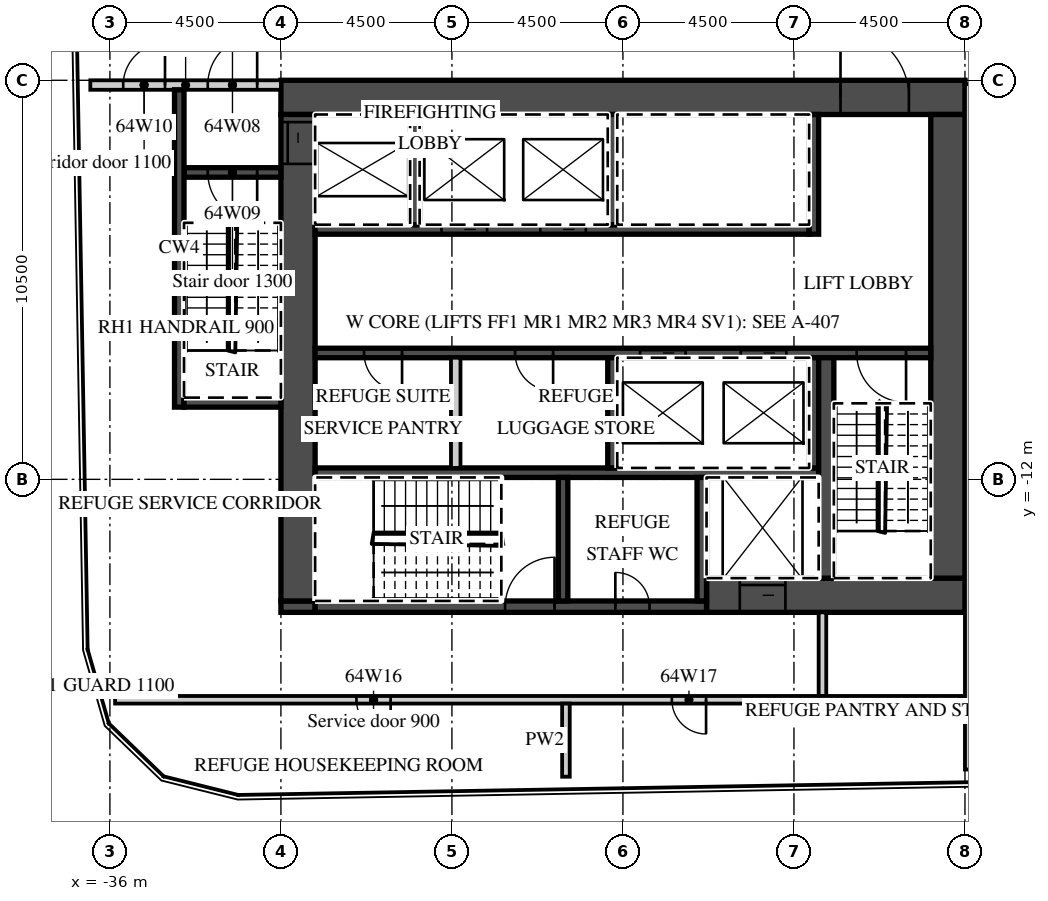
"""IFC4 building model, lengths in metres.
Left out: names, types, materials, properties, quantities, classifications, styles, units other than length and angle.
Written with IfcOpenShell. Run it as: python <this file> out.ifc"""

import sys

from ifc_helpers import new_model, si_unit, direction, frame, frame_2d, origin, place, context, subcontext, project, spatial, rectangle, extrude, element, fill, save


model = new_model("IFC4")
c1 = context("Model", 3, precision=1e-05, world=origin(), true_north=direction((0.0, 1.0)))
c2 = subcontext(c1, "Body", "Model", "MODEL_VIEW")
j1 = project(units=[si_unit("LENGTHUNIT", "METRE"), si_unit("PLANEANGLEUNIT", "RADIAN")], contexts=[c1])
p1 = place(None, origin())
s1 = spatial("IfcSite", under=j1, at=p1, CompositionType="ELEMENT")
p2 = place(p1, origin())
s2 = spatial("IfcBuilding", under=s1, at=p2, CompositionType="ELEMENT")
p3 = place(p2, frame((0.0, 0.0, 257.3)))
s3 = spatial("IfcBuildingStorey", under=s2, at=p3, CompositionType="ELEMENT", Elevation=257.3)
p4 = place(p3, frame((-31.5, -1.95, 0.0), z_axis=(0.0, 0.0, 1.0), x_axis=(1.0, 0.0, 0.0)))
e1 = element("IfcWall", 1, at=p4, inside=s3, PredefinedType="SHEAR", context=c2, shape_type="SweptSolid", body=[
    extrude(rectangle(XDim=18.0, YDim=0.9, at=frame_2d((9.0, 0.0))), origin(), (0.0, 0.0, 1.0), 4.2),
])
p5 = place(p4, frame((14.725, 0.0, 0.0)))
e2 = element("IfcOpeningElement", 2, at=p5, cuts=e1, PredefinedType="OPENING", context=c2, shape_type="SweptSolid", body=[
    extrude(rectangle(XDim=1.8, YDim=2.1, at=frame_2d((0.9, 1.05))), frame((0.0, 0.46, 0.0), z_axis=(0.0, -1.0, 0.0), x_axis=(1.0, 0.0, 0.0)), (0.0, 0.0, 1.0), 0.92),
])
p6 = place(p3, frame((-20.3, -15.05, 0.0), z_axis=(0.0, 0.0, 1.0), x_axis=(1.0, 0.0, 0.0)))
e3 = element("IfcWall", 3, at=p6, inside=s3, PredefinedType="SHEAR", context=c2, shape_type="SweptSolid", body=[
    extrude(rectangle(XDim=6.8, YDim=0.9, at=frame_2d((3.4, 0.0))), origin(), (0.0, 0.0, 1.0), 4.2),
])
p7 = place(p6, frame((0.875, 0.0, 0.0)))
e4 = element("IfcOpeningElement", 4, at=p7, cuts=e3, PredefinedType="OPENING", context=c2, shape_type="SweptSolid", body=[
    extrude(rectangle(XDim=1.2, YDim=2.1, at=frame_2d((0.6, 1.05))), frame((0.0, 0.46, 0.0), z_axis=(0.0, -1.0, 0.0), x_axis=(1.0, 0.0, 0.0)), (0.0, 0.0, 1.0), 0.92),
])
p8 = place(p3, frame((-31.5, -15.35, 0.0), z_axis=(0.0, 0.0, 1.0), x_axis=(1.0, 0.0, 0.0)))
e5 = element("IfcWall", 5, at=p8, inside=s3, PredefinedType="SHEAR", context=c2, shape_type="SweptSolid", body=[
    extrude(rectangle(XDim=0.9, YDim=0.3, at=frame_2d((0.45, 0.0))), origin(), (0.0, 0.0, 1.0), 4.2),
])
p9 = place(p3, frame((-30.6, -15.35, 0.0), z_axis=(0.0, 0.0, 1.0), x_axis=(1.0, 0.0, 0.0)))
e6 = element("IfcWall", 6, at=p9, inside=s3, PredefinedType="SHEAR", context=c2, shape_type="SweptSolid", body=[
    extrude(rectangle(XDim=10.3, YDim=0.3, at=frame_2d((5.15, 0.0))), origin(), (0.0, 0.0, 1.0), 4.2),
])
p10 = place(p9, frame((5.0, 0.0, 0.0)))
e7 = element("IfcOpeningElement", 7, at=p10, cuts=e6, PredefinedType="OPENING", context=c2, shape_type="SweptSolid", body=[
    extrude(rectangle(XDim=1.3, YDim=2.1, at=frame_2d((0.65, 1.05))), frame((0.0, 0.16, 0.0), z_axis=(0.0, -1.0, 0.0), x_axis=(1.0, 0.0, 0.0)), (0.0, 0.0, 1.0), 0.32),
])
p11 = place(p9, frame((7.9, 0.0, 0.0)))
e8 = element("IfcOpeningElement", 8, at=p11, cuts=e6, PredefinedType="OPENING", context=c2, shape_type="SweptSolid", body=[
    extrude(rectangle(XDim=0.9, YDim=2.1, at=frame_2d((0.45, 1.05))), frame((0.0, 0.16, 0.0), z_axis=(0.0, -1.0, 0.0), x_axis=(1.0, 0.0, 0.0)), (0.0, 0.0, 1.0), 0.32),
])
p12 = place(p3, frame((-31.05, -15.2, 0.0), z_axis=(0.0, 0.0, 1.0), x_axis=(0.0, 1.0, 0.0)))
e9 = element("IfcWall", 9, at=p12, inside=s3, PredefinedType="SHEAR", context=c2, shape_type="SweptSolid", body=[
    extrude(rectangle(XDim=12.8, YDim=0.9, at=frame_2d((6.4, 0.0))), origin(), (0.0, 0.0, 1.0), 4.2),
])
p13 = place(p12, frame((11.5, 0.0, 0.0)))
e10 = element("IfcOpeningElement", 10, at=p13, cuts=e9, PredefinedType="OPENING", context=c2, shape_type="SweptSolid", body=[
    extrude(rectangle(XDim=1.1, YDim=2.1, at=frame_2d((0.55, 1.05))), frame((0.0, 0.46, 0.0), z_axis=(0.0, -1.0, 0.0), x_axis=(1.0, 0.0, 0.0)), (0.0, 0.0, 1.0), 0.92),
])
p14 = place(p3, frame((-13.95, -14.6, 0.0), z_axis=(0.0, 0.0, 1.0), x_axis=(0.0, 1.0, 0.0)))
e11 = element("IfcWall", 11, at=p14, inside=s3, PredefinedType="SHEAR", context=c2, shape_type="SweptSolid", body=[
    extrude(rectangle(XDim=12.2, YDim=0.9, at=frame_2d((6.1, 0.0))), origin(), (0.0, 0.0, 1.0), 4.2),
])
p15 = place(p3, frame((-30.6, -5.425, 0.0), z_axis=(0.0, 0.0, 1.0), x_axis=(1.0, 0.0, 0.0)))
e12 = element("IfcWall", 12, at=p15, inside=s3, PredefinedType="SHEAR", context=c2, shape_type="SweptSolid", body=[
    extrude(rectangle(XDim=13.0, YDim=0.25, at=frame_2d((6.5, 0.0))), origin(), (0.0, 0.0, 1.0), 4.2),
])
p16 = place(p15, frame((3.325, 0.0, 0.0)))
e13 = element("IfcOpeningElement", 13, at=p16, cuts=e12, PredefinedType="OPENING", context=c2, shape_type="SweptSolid", body=[
    extrude(rectangle(XDim=1.2, YDim=2.1, at=frame_2d((0.6, 1.05))), frame((0.0, 0.135, 0.0), z_axis=(0.0, -1.0, 0.0), x_axis=(1.0, 0.0, 0.0)), (0.0, 0.0, 1.0), 0.27),
])
p17 = place(p15, frame((5.925, 0.0, 0.0)))
e14 = element("IfcOpeningElement", 14, at=p17, cuts=e12, PredefinedType="OPENING", context=c2, shape_type="SweptSolid", body=[
    extrude(rectangle(XDim=1.2, YDim=2.1, at=frame_2d((0.6, 1.05))), frame((0.0, 0.135, 0.0), z_axis=(0.0, -1.0, 0.0), x_axis=(1.0, 0.0, 0.0)), (0.0, 0.0, 1.0), 0.27),
])
p18 = place(p3, frame((-17.475, -5.55, 0.0), z_axis=(0.0, 0.0, 1.0), x_axis=(0.0, 1.0, 0.0)))
e15 = element("IfcWall", 15, at=p18, inside=s3, PredefinedType="SHEAR", context=c2, shape_type="SweptSolid", body=[
    extrude(rectangle(XDim=3.15, YDim=0.25, at=frame_2d((1.575, 0.0))), origin(), (0.0, 0.0, 1.0), 4.2),
])
for number, where, z_axis, x_axis in (
    (16, (-27.975, -5.3, 0.0), (0.0, 0.0, 1.0), (0.0, 1.0, 0.0)),
    (17, (-22.775, -5.3, 0.0), (0.0, 0.0, 1.0), (0.0, 1.0, 0.0)),
):
    element("IfcWall", number, at=place(p3, frame(where, z_axis=z_axis, x_axis=x_axis)), inside=s3, PredefinedType="SHEAR", context=c2, shape_type="SweptSolid", body=[
        extrude(rectangle(XDim=2.9, YDim=0.25, at=frame_2d((1.45, 0.0))), origin(), (0.0, 0.0, 1.0), 4.2),
    ])
p19 = place(p3, frame((-30.6, -8.675, 0.0), z_axis=(0.0, 0.0, 1.0), x_axis=(1.0, 0.0, 0.0)))
e18 = element("IfcWall", 18, at=p19, inside=s3, PredefinedType="SHEAR", context=c2, shape_type="SweptSolid", body=[
    extrude(rectangle(XDim=16.2, YDim=0.25, at=frame_2d((8.1, 0.0))), origin(), (0.0, 0.0, 1.0), 4.2),
])
p20 = place(p19, frame((8.55, 0.0, 0.0)))
e19 = element("IfcOpeningElement", 19, at=p20, cuts=e18, PredefinedType="OPENING", context=c2, shape_type="SweptSolid", body=[
    extrude(rectangle(XDim=1.2, YDim=2.1, at=frame_2d((0.6, 1.05))), frame((0.0, 0.135, 0.0), z_axis=(0.0, -1.0, 0.0), x_axis=(1.0, 0.0, 0.0)), (0.0, 0.0, 1.0), 0.27),
])
p21 = place(p19, frame((11.2, 0.0, 0.0)))
e20 = element("IfcOpeningElement", 20, at=p21, cuts=e18, PredefinedType="OPENING", context=c2, shape_type="SweptSolid", body=[
    extrude(rectangle(XDim=1.2, YDim=2.1, at=frame_2d((0.6, 1.05))), frame((0.0, 0.135, 0.0), z_axis=(0.0, -1.0, 0.0), x_axis=(1.0, 0.0, 0.0)), (0.0, 0.0, 1.0), 0.27),
])
p22 = place(p19, frame((14.25, 0.0, 0.0)))
e21 = element("IfcOpeningElement", 21, at=p22, cuts=e18, PredefinedType="OPENING", context=c2, shape_type="SweptSolid", body=[
    extrude(rectangle(XDim=1.3, YDim=2.1, at=frame_2d((0.65, 1.05))), frame((0.0, 0.135, 0.0), z_axis=(0.0, -1.0, 0.0), x_axis=(1.0, 0.0, 0.0)), (0.0, 0.0, 1.0), 0.27),
])
p23 = place(p19, frame((1.288, 0.0, 0.0)))
e22 = element("IfcOpeningElement", 22, at=p23, cuts=e18, PredefinedType="OPENING", context=c2, shape_type="SweptSolid", body=[
    extrude(rectangle(XDim=1.0, YDim=2.1, at=frame_2d((0.5, 1.05))), frame((0.0, 0.135, 0.0), z_axis=(0.0, -1.0, 0.0), x_axis=(1.0, 0.0, 0.0)), (0.0, 0.0, 1.0), 0.27),
])
p24 = place(p19, frame((5.262, 0.0, 0.0)))
e23 = element("IfcOpeningElement", 23, at=p24, cuts=e18, PredefinedType="OPENING", context=c2, shape_type="SweptSolid", body=[
    extrude(rectangle(XDim=1.0, YDim=2.1, at=frame_2d((0.5, 1.05))), frame((0.0, 0.135, 0.0), z_axis=(0.0, -1.0, 0.0), x_axis=(1.0, 0.0, 0.0)), (0.0, 0.0, 1.0), 0.27),
])
p25 = place(p3, frame((-30.6, -11.825, 0.0), z_axis=(0.0, 0.0, 1.0), x_axis=(1.0, 0.0, 0.0)))
e24 = element("IfcWall", 24, at=p25, inside=s3, PredefinedType="SHEAR", context=c2, shape_type="SweptSolid", body=[
    extrude(rectangle(XDim=13.25, YDim=0.25, at=frame_2d((6.625, 0.0))), origin(), (0.0, 0.0, 1.0), 4.2),
])
for number, where, z_axis, x_axis in (
    (25, (-17.475, -11.7, 0.0), (0.0, 0.0, 1.0), (0.0, 1.0, 0.0)),
    (26, (-22.775, -11.7, 0.0), (0.0, 0.0, 1.0), (0.0, 1.0, 0.0)),
):
    element("IfcWall", number, at=place(p3, frame(where, z_axis=z_axis, x_axis=x_axis)), inside=s3, PredefinedType="SHEAR", context=c2, shape_type="SweptSolid", body=[
        extrude(rectangle(XDim=2.9, YDim=0.25, at=frame_2d((1.45, 0.0))), origin(), (0.0, 0.0, 1.0), 4.2),
    ])
p26 = place(p3, frame((-26.9, -11.7, 0.0), z_axis=(0.0, 0.0, 1.0), x_axis=(0.0, 1.0, 0.0)))
e27 = element("IfcWall", 27, at=p26, inside=s3, PredefinedType="PARTITIONING", context=c2, shape_type="SweptSolid", body=[
    extrude(rectangle(XDim=2.9, YDim=0.25, at=frame_2d((1.45, 0.0))), origin(), (0.0, 0.0, 1.0), 4.2),
])
p27 = place(p3, frame((-17.15, -14.6, 0.0), z_axis=(0.0, 0.0, 1.0), x_axis=(0.0, 1.0, 0.0)))
e28 = element("IfcWall", 28, at=p27, inside=s3, PredefinedType="SHEAR", context=c2, shape_type="SweptSolid", body=[
    extrude(rectangle(XDim=5.8, YDim=0.4, at=frame_2d((2.9, 0.0))), origin(), (0.0, 0.0, 1.0), 4.2),
])
for number, where, z_axis, x_axis in (
    (29, (-20.425, -15.2, 0.0), (0.0, 0.0, 1.0), (0.0, 1.0, 0.0)),
    (30, (-24.075, -15.2, 0.0), (0.0, 0.0, 1.0), (0.0, 1.0, 0.0)),
):
    element("IfcWall", number, at=place(p3, frame(where, z_axis=z_axis, x_axis=x_axis)), inside=s3, PredefinedType="SHEAR", context=c2, shape_type="SweptSolid", body=[
        extrude(rectangle(XDim=3.25, YDim=0.25, at=frame_2d((1.625, 0.0))), origin(), (0.0, 0.0, 1.0), 4.2),
    ])
p28 = place(p3, frame((-36.515, -1.625, 0.0), z_axis=(0.0, 0.0, 1.0), x_axis=(1.0, 0.0, 0.0)))
e31 = element("IfcWall", 31, at=p28, inside=s3, PredefinedType="PARTITIONING", context=c2, shape_type="SweptSolid", body=[
    extrude(rectangle(XDim=5.015, YDim=0.25, at=frame_2d((2.508, 0.0))), origin(), (0.0, 0.0, 1.0), 4.2),
])
p29 = place(p28, frame((3.09, 0.0, 0.0)))
e32 = element("IfcOpeningElement", 32, at=p29, cuts=e31, PredefinedType="OPENING", context=c2, shape_type="SweptSolid", body=[
    extrude(rectangle(XDim=1.3, YDim=2.1, at=frame_2d((0.65, 1.05))), frame((0.0, 0.135, 0.0), z_axis=(0.0, -1.0, 0.0), x_axis=(1.0, 0.0, 0.0)), (0.0, 0.0, 1.0), 0.27),
])
p30 = place(p28, frame((0.865, 0.0, 0.0)))
e33 = element("IfcOpeningElement", 33, at=p30, cuts=e31, PredefinedType="OPENING", context=c2, shape_type="SweptSolid", body=[
    extrude(rectangle(XDim=1.1, YDim=2.1, at=frame_2d((0.55, 1.05))), frame((0.0, 0.135, 0.0), z_axis=(0.0, -1.0, 0.0), x_axis=(1.0, 0.0, 0.0)), (0.0, 0.0, 1.0), 0.27),
])
p31 = place(p3, frame((-34.05, -3.925, 0.0), z_axis=(0.0, 0.0, 1.0), x_axis=(1.0, 0.0, 0.0)))
e34 = element("IfcWall", 34, at=p31, inside=s3, PredefinedType="SHEAR", context=c2, shape_type="SweptSolid", body=[
    extrude(rectangle(XDim=2.55, YDim=0.25, at=frame_2d((1.275, 0.0))), origin(), (0.0, 0.0, 1.0), 4.2),
])
p32 = place(p31, frame((0.625, 0.0, 0.0)))
e35 = element("IfcOpeningElement", 35, at=p32, cuts=e34, PredefinedType="OPENING", context=c2, shape_type="SweptSolid", body=[
    extrude(rectangle(XDim=1.3, YDim=2.1, at=frame_2d((0.65, 1.05))), frame((0.0, 0.135, 0.0), z_axis=(0.0, -1.0, 0.0), x_axis=(1.0, 0.0, 0.0)), (0.0, 0.0, 1.0), 0.27),
])
p33 = place(p3, frame((-34.175, -10.1, 0.0), z_axis=(0.0, 0.0, 1.0), x_axis=(0.0, 1.0, 0.0)))
e36 = element("IfcWall", 36, at=p33, inside=s3, PredefinedType="SHEAR", context=c2, shape_type="SweptSolid", body=[
    extrude(rectangle(XDim=8.35, YDim=0.25, at=frame_2d((4.175, 0.0))), origin(), (0.0, 0.0, 1.0), 4.2),
])
p34 = place(p3, frame((-34.05, -9.975, 0.0), z_axis=(0.0, 0.0, 1.0), x_axis=(1.0, 0.0, 0.0)))
e37 = element("IfcWall", 37, at=p34, inside=s3, PredefinedType="SHEAR", context=c2, shape_type="SweptSolid", body=[
    extrude(rectangle(XDim=2.55, YDim=0.25, at=frame_2d((1.275, 0.0))), origin(), (0.0, 0.0, 1.0), 4.2),
])
p35 = place(p3, frame((-17.25, -17.7, 0.0), z_axis=(0.0, 0.0, 1.0), x_axis=(0.0, 1.0, 0.0)))
e38 = element("IfcWall", 38, at=p35, inside=s3, PredefinedType="PARTITIONING", context=c2, shape_type="SweptSolid", body=[
    extrude(rectangle(XDim=2.2, YDim=0.2, at=frame_2d((1.1, 0.0))), origin(), (0.0, 0.0, 1.0), 4.2),
])
p36 = place(p3, frame((-35.864, -17.8, 0.0), z_axis=(0.0, 0.0, 1.0), x_axis=(1.0, 0.0, 0.0)))
e39 = element("IfcWall", 39, at=p36, inside=s3, PredefinedType="PARTITIONING", context=c2, shape_type="SweptSolid", body=[
    extrude(rectangle(XDim=22.264, YDim=0.2, at=frame_2d((11.132, 0.0))), origin(), (0.0, 0.0, 1.0), 4.2),
])
p37 = place(p36, frame((6.351, 0.0, 0.0)))
e40 = element("IfcOpeningElement", 40, at=p37, cuts=e39, PredefinedType="OPENING", context=c2, shape_type="SweptSolid", body=[
    extrude(rectangle(XDim=0.9, YDim=2.1, at=frame_2d((0.45, 1.05))), frame((0.0, 0.11, 0.0), z_axis=(0.0, -1.0, 0.0), x_axis=(1.0, 0.0, 0.0)), (0.0, 0.0, 1.0), 0.22),
])
p38 = place(p36, frame((14.651, 0.0, 0.0)))
e41 = element("IfcOpeningElement", 41, at=p38, cuts=e39, PredefinedType="OPENING", context=c2, shape_type="SweptSolid", body=[
    extrude(rectangle(XDim=0.9, YDim=2.1, at=frame_2d((0.45, 1.05))), frame((0.0, 0.11, 0.0), z_axis=(0.0, -1.0, 0.0), x_axis=(1.0, 0.0, 0.0)), (0.0, 0.0, 1.0), 0.22),
])
p39 = place(p3, frame((-24.0, -19.824, 0.0), z_axis=(0.0, 0.0, 1.0), x_axis=(0.0, 1.0, 0.0)))
e42 = element("IfcWall", 42, at=p39, inside=s3, PredefinedType="PARTITIONING", context=c2, shape_type="SweptSolid", body=[
    extrude(rectangle(XDim=1.925, YDim=0.2, at=frame_2d((0.962, 0.0))), origin(), (0.0, 0.0, 1.0), 4.2),
])
p40 = place(p3, frame((-13.4, -19.636, 0.0), z_axis=(0.0, 0.0, 1.0), x_axis=(0.0, 1.0, 0.0)))
e43 = element("IfcWall", 43, at=p40, inside=s3, PredefinedType="PARTITIONING", context=c2, shape_type="SweptSolid", body=[
    extrude(rectangle(XDim=18.036, YDim=0.2, at=frame_2d((9.018, 0.0))), origin(), (0.0, 0.0, 1.0), 4.2),
])
p41 = place(p20, origin())
e44 = element("IfcDoor", 44, at=p41, inside=s3, OperationType="SLIDING_TO_LEFT", PredefinedType="DOOR", context=c2, shape_type="SweptSolid", body=[
    extrude(rectangle(XDim=1.2, YDim=2.1, at=frame_2d((0.6, 1.05))), frame((0.0, 0.025, 0.0), z_axis=(0.0, -1.0, 0.0), x_axis=(1.0, 0.0, 0.0)), (0.0, 0.0, 1.0), 0.05),
])
fill(e19, e44)
p42 = place(p21, origin())
e45 = element("IfcDoor", 45, at=p42, inside=s3, OperationType="SLIDING_TO_RIGHT", PredefinedType="DOOR", context=c2, shape_type="SweptSolid", body=[
    extrude(rectangle(XDim=1.2, YDim=2.1, at=frame_2d((0.6, 1.05))), frame((0.0, 0.025, 0.0), z_axis=(0.0, -1.0, 0.0), x_axis=(1.0, 0.0, 0.0)), (0.0, 0.0, 1.0), 0.05),
])
fill(e20, e45)
p43 = place(p16, origin())
e46 = element("IfcDoor", 46, at=p43, inside=s3, OperationType="SLIDING_TO_RIGHT", PredefinedType="DOOR", context=c2, shape_type="SweptSolid", body=[
    extrude(rectangle(XDim=1.2, YDim=2.1, at=frame_2d((0.6, 1.05))), frame((0.0, 0.025, 0.0), z_axis=(0.0, -1.0, 0.0), x_axis=(1.0, 0.0, 0.0)), (0.0, 0.0, 1.0), 0.05),
])
fill(e13, e46)
p44 = place(p17, origin())
e47 = element("IfcDoor", 47, at=p44, inside=s3, OperationType="SLIDING_TO_RIGHT", PredefinedType="DOOR", context=c2, shape_type="SweptSolid", body=[
    extrude(rectangle(XDim=1.2, YDim=2.1, at=frame_2d((0.6, 1.05))), frame((0.0, 0.025, 0.0), z_axis=(0.0, -1.0, 0.0), x_axis=(1.0, 0.0, 0.0)), (0.0, 0.0, 1.0), 0.05),
])
fill(e14, e47)
p45 = place(p7, origin())
e48 = element("IfcDoor", 48, at=p45, inside=s3, OperationType="SLIDING_TO_LEFT", PredefinedType="DOOR", context=c2, shape_type="SweptSolid", body=[
    extrude(rectangle(XDim=1.2, YDim=2.1, at=frame_2d((0.6, 1.05))), frame((0.0, 0.025, 0.0), z_axis=(0.0, -1.0, 0.0), x_axis=(1.0, 0.0, 0.0)), (0.0, 0.0, 1.0), 0.05),
])
fill(e4, e48)
p46 = place(p13, origin())
e49 = element("IfcDoor", 49, at=p46, inside=s3, OperationType="SLIDING_TO_RIGHT", PredefinedType="DOOR", context=c2, shape_type="SweptSolid", body=[
    extrude(rectangle(XDim=1.1, YDim=2.1, at=frame_2d((0.55, 1.05))), frame((0.0, 0.025, 0.0), z_axis=(0.0, -1.0, 0.0), x_axis=(1.0, 0.0, 0.0)), (0.0, 0.0, 1.0), 0.05),
])
fill(e10, e49)
p47 = place(p5, origin())
e50 = element("IfcDoor", 50, at=p47, inside=s3, OperationType="DOUBLE_DOOR_DOUBLE_SWING", PredefinedType="DOOR", context=c2, shape_type="SweptSolid", body=[
    extrude(rectangle(XDim=1.8, YDim=2.1, at=frame_2d((0.9, 1.05))), frame((0.0, 0.025, 0.0), z_axis=(0.0, -1.0, 0.0), x_axis=(1.0, 0.0, 0.0)), (0.0, 0.0, 1.0), 0.05),
])
fill(e2, e50)
p48 = place(p29, origin())
e51 = element("IfcDoor", 51, at=p48, inside=s3, OperationType="SINGLE_SWING_RIGHT", PredefinedType="DOOR", context=c2, shape_type="SweptSolid", body=[
    extrude(rectangle(XDim=1.3, YDim=2.1, at=frame_2d((0.65, 1.05))), frame((0.0, 0.025, 0.0), z_axis=(0.0, -1.0, 0.0), x_axis=(1.0, 0.0, 0.0)), (0.0, 0.0, 1.0), 0.05),
])
fill(e32, e51)
p49 = place(p32, origin())
e52 = element("IfcDoor", 52, at=p49, inside=s3, OperationType="SINGLE_SWING_RIGHT", PredefinedType="DOOR", context=c2, shape_type="SweptSolid", body=[
    extrude(rectangle(XDim=1.3, YDim=2.1, at=frame_2d((0.65, 1.05))), frame((0.0, 0.025, 0.0), z_axis=(0.0, -1.0, 0.0), x_axis=(1.0, 0.0, 0.0)), (0.0, 0.0, 1.0), 0.05),
])
fill(e35, e52)
p50 = place(p30, origin())
e53 = element("IfcDoor", 53, at=p50, inside=s3, OperationType="SINGLE_SWING_RIGHT", PredefinedType="DOOR", context=c2, shape_type="SweptSolid", body=[
    extrude(rectangle(XDim=1.1, YDim=2.1, at=frame_2d((0.55, 1.05))), frame((0.0, 0.025, 0.0), z_axis=(0.0, -1.0, 0.0), x_axis=(1.0, 0.0, 0.0)), (0.0, 0.0, 1.0), 0.05),
])
fill(e33, e53)
p51 = place(p22, origin())
e54 = element("IfcDoor", 54, at=p51, inside=s3, OperationType="SINGLE_SWING_RIGHT", PredefinedType="DOOR", context=c2, shape_type="SweptSolid", body=[
    extrude(rectangle(XDim=1.3, YDim=2.1, at=frame_2d((0.65, 1.05))), frame((0.0, 0.025, 0.0), z_axis=(0.0, -1.0, 0.0), x_axis=(1.0, 0.0, 0.0)), (0.0, 0.0, 1.0), 0.05),
])
fill(e21, e54)
p52 = place(p10, origin())
e55 = element("IfcDoor", 55, at=p52, inside=s3, OperationType="SINGLE_SWING_RIGHT", PredefinedType="DOOR", context=c2, shape_type="SweptSolid", body=[
    extrude(rectangle(XDim=1.3, YDim=2.1, at=frame_2d((0.65, 1.05))), frame((0.0, 0.025, 0.0), z_axis=(0.0, -1.0, 0.0), x_axis=(1.0, 0.0, 0.0)), (0.0, 0.0, 1.0), 0.05),
])
fill(e7, e55)
p53 = place(p11, origin())
e56 = element("IfcDoor", 56, at=p53, inside=s3, OperationType="SINGLE_SWING_LEFT", PredefinedType="DOOR", context=c2, shape_type="SweptSolid", body=[
    extrude(rectangle(XDim=0.9, YDim=2.1, at=frame_2d((0.45, 1.05))), frame((0.0, 0.025, 0.0), z_axis=(0.0, -1.0, 0.0), x_axis=(1.0, 0.0, 0.0)), (0.0, 0.0, 1.0), 0.05),
])
fill(e8, e56)
p54 = place(p23, origin())
e57 = element("IfcDoor", 57, at=p54, inside=s3, OperationType="SINGLE_SWING_RIGHT", PredefinedType="DOOR", context=c2, shape_type="SweptSolid", body=[
    extrude(rectangle(XDim=1.0, YDim=2.1, at=frame_2d((0.5, 1.05))), frame((0.0, 0.025, 0.0), z_axis=(0.0, -1.0, 0.0), x_axis=(1.0, 0.0, 0.0)), (0.0, 0.0, 1.0), 0.05),
])
fill(e22, e57)
p55 = place(p24, origin())
e58 = element("IfcDoor", 58, at=p55, inside=s3, OperationType="SINGLE_SWING_RIGHT", PredefinedType="DOOR", context=c2, shape_type="SweptSolid", body=[
    extrude(rectangle(XDim=1.0, YDim=2.1, at=frame_2d((0.5, 1.05))), frame((0.0, 0.025, 0.0), z_axis=(0.0, -1.0, 0.0), x_axis=(1.0, 0.0, 0.0)), (0.0, 0.0, 1.0), 0.05),
])
fill(e23, e58)
p56 = place(p37, origin())
e59 = element("IfcDoor", 59, at=p56, inside=s3, OperationType="SINGLE_SWING_RIGHT", PredefinedType="DOOR", context=c2, shape_type="SweptSolid", body=[
    extrude(rectangle(XDim=0.9, YDim=2.1, at=frame_2d((0.45, 1.05))), frame((0.0, 0.025, 0.0), z_axis=(0.0, -1.0, 0.0), x_axis=(1.0, 0.0, 0.0)), (0.0, 0.0, 1.0), 0.05),
])
fill(e40, e59)
p57 = place(p38, origin())
e60 = element("IfcDoor", 60, at=p57, inside=s3, OperationType="SINGLE_SWING_RIGHT", PredefinedType="DOOR", context=c2, shape_type="SweptSolid", body=[
    extrude(rectangle(XDim=0.9, YDim=2.1, at=frame_2d((0.45, 1.05))), frame((0.0, 0.025, 0.0), z_axis=(0.0, -1.0, 0.0), x_axis=(1.0, 0.0, 0.0)), (0.0, 0.0, 1.0), 0.05),
])
fill(e41, e60)
save(model, sys.argv[1])
